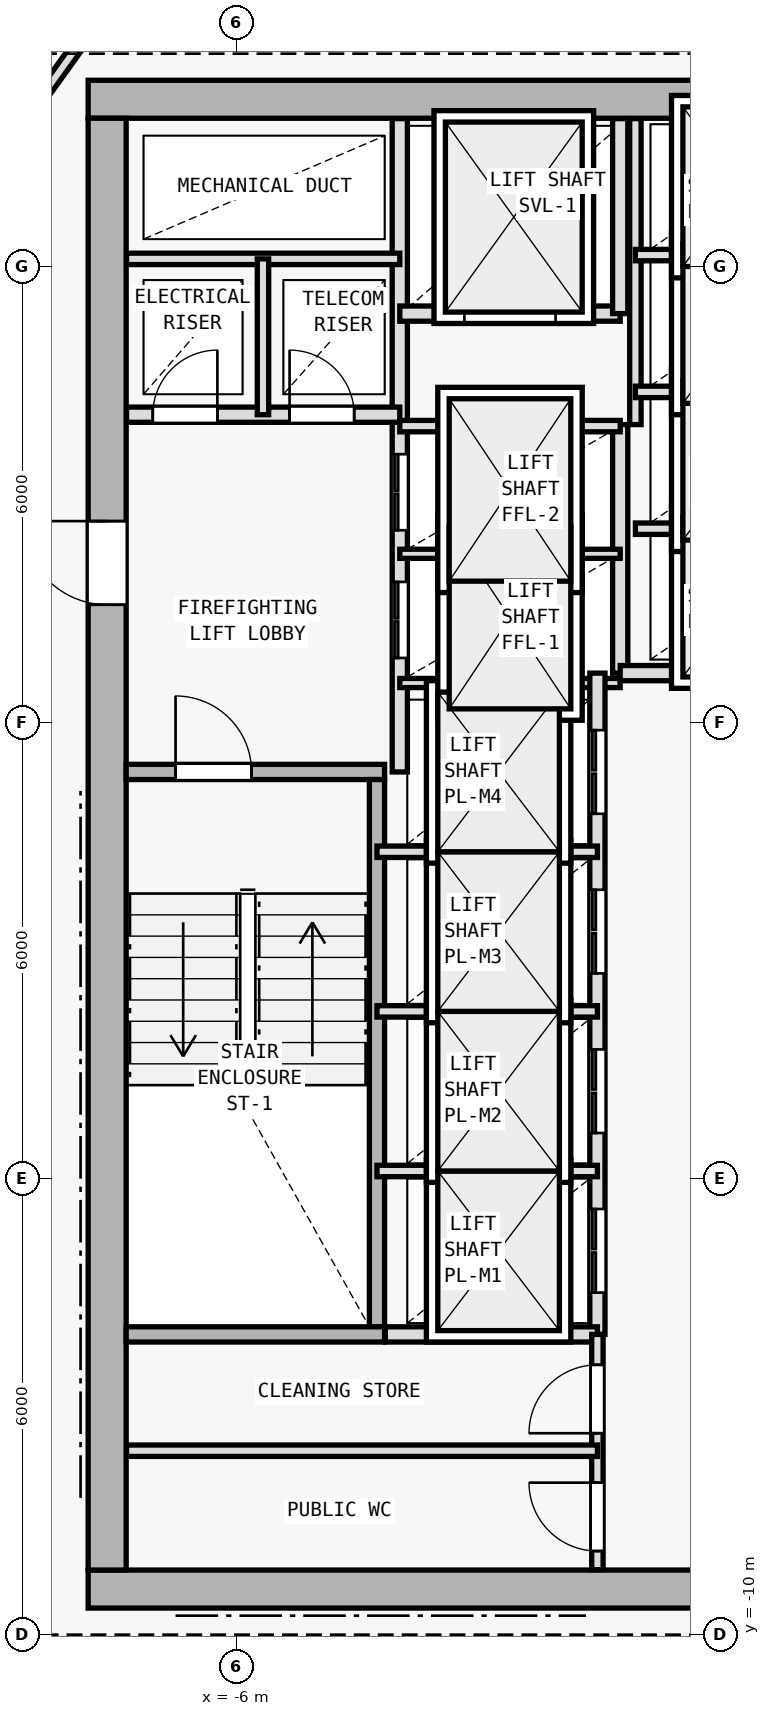
"""IFC4 building model, lengths in metres.
Left out: names, types, materials, properties, quantities, classifications, styles, units other than length and angle.
Written with IfcOpenShell. Run it as: python <this file> out.ifc"""

import sys

from ifc_helpers import new_model, si_unit, direction, frame, frame_2d, origin, origin_2d, place, context, subcontext, project, spatial, rectangle, i_section, extrude, element, fill, save


model = new_model("IFC4")
c1 = context("Model", 3, precision=1e-05, world=origin(), true_north=direction((0.0, 1.0)))
c2 = subcontext(c1, "Body", "Model", "MODEL_VIEW")
j1 = project(units=[si_unit("LENGTHUNIT", "METRE"), si_unit("PLANEANGLEUNIT", "RADIAN")], contexts=[c1])
p1 = place(None, origin())
s1 = spatial("IfcSite", under=j1, at=p1, CompositionType="ELEMENT")
p2 = place(p1, origin())
s2 = spatial("IfcBuilding", under=s1, at=p2, CompositionType="ELEMENT")
p3 = place(p2, frame((0.0, 0.0, 212.7)))
s3 = spatial("IfcBuildingStorey", under=s2, at=p3, CompositionType="ELEMENT", Elevation=212.7)
for number, where, z_axis, x_axis in (
    (1, (-7.7, -9.4, 0.0), (0.0, 0.0, 1.0), (1.0, 0.0, 0.0)),
    (2, (-7.7, 10.2, 0.0), (0.0, 0.0, 1.0), (1.0, 0.0, 0.0)),
    (3, (0.0, -9.4, 0.0), (0.0, 0.0, 1.0), (1.0, 0.0, 0.0)),
    (4, (-7.7, 2.0, 0.0), (0.0, 0.0, 1.0), (1.0, 0.0, 0.0)),
):
    element("IfcColumn", number, at=place(p3, frame(where, z_axis=z_axis, x_axis=x_axis)), inside=s3, PredefinedType="COLUMN", context=c2, shape_type="SweptSolid", body=[
        extrude(i_section(OverallWidth=0.398, OverallDepth=0.387, WebThickness=0.013, FlangeThickness=0.022, FilletRadius=0.015, at=origin_2d()), origin(), (0.0, 0.0, 1.0), 3.6),
    ])
p4 = place(p3, frame((-7.95, -9.4, 0.0), z_axis=(0.0, 0.0, 1.0), x_axis=(1.0, 0.0, 0.0)))
e5 = element("IfcWall", 5, at=p4, inside=s3, PredefinedType="SHEAR", context=c2, shape_type="SweptSolid", body=[
    extrude(rectangle(XDim=15.9, YDim=0.5, at=frame_2d((7.95, 0.0))), origin(), (0.0, 0.0, 1.0), 3.35),
])
p5 = place(p4, frame((9.6, 0.0, 0.0)))
e6 = element("IfcOpeningElement", 6, at=p5, cuts=e5, PredefinedType="OPENING", context=c2, shape_type="SweptSolid", body=[
    extrude(rectangle(XDim=1.5, YDim=2.2, at=frame_2d((0.75, 1.1))), frame((0.0, 0.26, 0.0), z_axis=(0.0, -1.0, 0.0), x_axis=(1.0, 0.0, 0.0)), (0.0, 0.0, 1.0), 0.52),
])
p6 = place(p3, frame((7.95, 10.2, 0.0), z_axis=(0.0, 0.0, 1.0), x_axis=(-1.0, 0.0, 0.0)))
e7 = element("IfcWall", 7, at=p6, inside=s3, PredefinedType="SHEAR", context=c2, shape_type="SweptSolid", body=[
    extrude(rectangle(XDim=15.9, YDim=0.5, at=frame_2d((7.95, 0.0))), origin(), (0.0, 0.0, 1.0), 3.35),
])
p7 = place(p6, frame((4.4, 0.0, 0.0)))
e8 = element("IfcOpeningElement", 8, at=p7, cuts=e7, PredefinedType="OPENING", context=c2, shape_type="SweptSolid", body=[
    extrude(rectangle(XDim=1.1, YDim=2.15, at=frame_2d((0.55, 1.075))), frame((0.0, 0.26, 0.0), z_axis=(0.0, -1.0, 0.0), x_axis=(1.0, 0.0, 0.0)), (0.0, 0.0, 1.0), 0.52),
])
p8 = place(p3, frame((-7.7, -9.15, 0.0), z_axis=(0.0, 0.0, 1.0), x_axis=(0.0, 1.0, 0.0)))
e9 = element("IfcWall", 9, at=p8, inside=s3, PredefinedType="SHEAR", context=c2, shape_type="SweptSolid", body=[
    extrude(rectangle(XDim=19.1, YDim=0.5, at=frame_2d((9.55, 0.0))), origin(), (0.0, 0.0, 1.0), 3.35),
])
p9 = place(p8, frame((12.7, 0.0, 0.0)))
e10 = element("IfcOpeningElement", 10, at=p9, cuts=e9, PredefinedType="OPENING", context=c2, shape_type="SweptSolid", body=[
    extrude(rectangle(XDim=1.1, YDim=2.15, at=frame_2d((0.55, 1.075))), frame((0.0, 0.26, 0.0), z_axis=(0.0, -1.0, 0.0), x_axis=(1.0, 0.0, 0.0)), (0.0, 0.0, 1.0), 0.52),
])
p10 = place(p3, frame((-7.45, 1.35, 0.0), z_axis=(0.0, 0.0, 1.0), x_axis=(1.0, 0.0, 0.0)))
e11 = element("IfcWall", 11, at=p10, inside=s3, PredefinedType="SOLIDWALL", context=c2, shape_type="SweptSolid", body=[
    extrude(rectangle(XDim=3.4, YDim=0.2, at=frame_2d((1.7, 0.0))), origin(), (0.0, 0.0, 1.0), 3.35),
])
p11 = place(p10, frame((0.65, 0.0, 0.0)))
e12 = element("IfcOpeningElement", 12, at=p11, cuts=e11, PredefinedType="OPENING", context=c2, shape_type="SweptSolid", body=[
    extrude(rectangle(XDim=1.0, YDim=2.15, at=frame_2d((0.5, 1.075))), frame((0.0, 0.11, 0.0), z_axis=(0.0, -1.0, 0.0), x_axis=(1.0, 0.0, 0.0)), (0.0, 0.0, 1.0), 0.22),
])
p12 = place(p3, frame((-4.15, -5.95, 0.0), z_axis=(0.0, 0.0, 1.0), x_axis=(0.0, 1.0, 0.0)))
e13 = element("IfcWall", 13, at=p12, inside=s3, PredefinedType="SOLIDWALL", context=c2, shape_type="SweptSolid", body=[
    extrude(rectangle(XDim=7.2, YDim=0.2, at=frame_2d((3.6, 0.0))), origin(), (0.0, 0.0, 1.0), 3.35),
])
p13 = place(p3, frame((-3.85, 1.35, 0.0), z_axis=(0.0, 0.0, 1.0), x_axis=(0.0, 1.0, 0.0)))
e14 = element("IfcWall", 14, at=p13, inside=s3, PredefinedType="SOLIDWALL", context=c2, shape_type="SweptSolid", body=[
    extrude(rectangle(XDim=8.595, YDim=0.2, at=frame_2d((4.297, 0.0))), origin(), (0.0, 0.0, 1.0), 3.35),
])
p14 = place(p13, frame((1.5, 0.0, 0.0)))
e15 = element("IfcOpeningElement", 15, at=p14, cuts=e14, PredefinedType="OPENING", context=c2, shape_type="SweptSolid", body=[
    extrude(rectangle(XDim=1.0, YDim=2.15, at=frame_2d((0.5, 1.075))), frame((0.0, 0.11, 0.0), z_axis=(0.0, -1.0, 0.0), x_axis=(1.0, 0.0, 0.0)), (0.0, 0.0, 1.0), 0.22),
])
p15 = place(p13, frame((3.18, 0.0, 0.0)))
e16 = element("IfcOpeningElement", 16, at=p15, cuts=e14, PredefinedType="OPENING", context=c2, shape_type="SweptSolid", body=[
    extrude(rectangle(XDim=1.0, YDim=2.15, at=frame_2d((0.5, 1.075))), frame((0.0, 0.11, 0.0), z_axis=(0.0, -1.0, 0.0), x_axis=(1.0, 0.0, 0.0)), (0.0, 0.0, 1.0), 0.22),
])
p16 = place(p3, frame((-7.445, 6.05, 0.0), z_axis=(0.0, 0.0, 1.0), x_axis=(1.0, 0.0, 0.0)))
e17 = element("IfcWall", 17, at=p16, inside=s3, PredefinedType="SOLIDWALL", context=c2, shape_type="SweptSolid", body=[
    extrude(rectangle(XDim=3.595, YDim=0.2, at=frame_2d((1.797, 0.0))), origin(), (0.0, 0.0, 1.0), 3.35),
])
p17 = place(p16, frame((0.345, 0.0, 0.0)))
e18 = element("IfcOpeningElement", 18, at=p17, cuts=e17, PredefinedType="OPENING", context=c2, shape_type="SweptSolid", body=[
    extrude(rectangle(XDim=0.85, YDim=2.1, at=frame_2d((0.425, 1.05))), frame((0.0, 0.11, 0.0), z_axis=(0.0, -1.0, 0.0), x_axis=(1.0, 0.0, 0.0)), (0.0, 0.0, 1.0), 0.22),
])
p18 = place(p16, frame((2.145, 0.0, 0.0)))
e19 = element("IfcOpeningElement", 19, at=p18, cuts=e17, PredefinedType="OPENING", context=c2, shape_type="SweptSolid", body=[
    extrude(rectangle(XDim=0.85, YDim=2.1, at=frame_2d((0.425, 1.05))), frame((0.0, 0.11, 0.0), z_axis=(0.0, -1.0, 0.0), x_axis=(1.0, 0.0, 0.0)), (0.0, 0.0, 1.0), 0.22),
])
p19 = place(p3, frame((-7.445, 8.1, 0.0), z_axis=(0.0, 0.0, 1.0), x_axis=(1.0, 0.0, 0.0)))
e20 = element("IfcWall", 20, at=p19, inside=s3, PredefinedType="PARTITIONING", context=c2, shape_type="SweptSolid", body=[
    extrude(rectangle(XDim=3.595, YDim=0.15, at=frame_2d((1.797, 0.0))), origin(), (0.0, 0.0, 1.0), 3.35),
])
p20 = place(p3, frame((-5.65, 6.05, 0.0), z_axis=(0.0, 0.0, 1.0), x_axis=(0.0, 1.0, 0.0)))
e21 = element("IfcWall", 21, at=p20, inside=s3, PredefinedType="PARTITIONING", context=c2, shape_type="SweptSolid", body=[
    extrude(rectangle(XDim=2.05, YDim=0.15, at=frame_2d((1.025, 0.0))), origin(), (0.0, 0.0, 1.0), 3.35),
])
p21 = place(p3, frame((-0.95, 2.65, 0.0), z_axis=(0.0, 0.0, 1.0), x_axis=(0.0, 1.0, 0.0)))
e22 = element("IfcWall", 22, at=p21, inside=s3, PredefinedType="SOLIDWALL", context=c2, shape_type="SweptSolid", body=[
    extrude(rectangle(XDim=3.27, YDim=0.2, at=frame_2d((1.635, 0.0))), origin(), (0.0, 0.0, 1.0), 3.35),
])
for number, where, z_axis, x_axis in (
    (23, (-3.85, 2.52, 0.0), (0.0, 0.0, 1.0), (1.0, 0.0, 0.0)),
    (24, (-3.85, 4.22, 0.0), (0.0, 0.0, 1.0), (1.0, 0.0, 0.0)),
):
    element("IfcWall", number, at=place(p3, frame(where, z_axis=z_axis, x_axis=x_axis)), inside=s3, PredefinedType="PARTITIONING", context=c2, shape_type="SweptSolid", body=[
        extrude(rectangle(XDim=2.9, YDim=0.12, at=frame_2d((1.45, 0.0))), origin(), (0.0, 0.0, 1.0), 3.35),
    ])
p22 = place(p3, frame((-3.85, 5.9, 0.0), z_axis=(0.0, 0.0, 1.0), x_axis=(1.0, 0.0, 0.0)))
e25 = element("IfcWall", 25, at=p22, inside=s3, PredefinedType="PARTITIONING", context=c2, shape_type="SweptSolid", body=[
    extrude(rectangle(XDim=2.9, YDim=0.15, at=frame_2d((1.45, 0.0))), origin(), (0.0, 0.0, 1.0), 3.35),
])
p23 = place(p3, frame((-3.85, 7.38, 0.0), z_axis=(0.0, 0.0, 1.0), x_axis=(1.0, 0.0, 0.0)))
e26 = element("IfcWall", 26, at=p23, inside=s3, PredefinedType="SOLIDWALL", context=c2, shape_type="SweptSolid", body=[
    extrude(rectangle(XDim=2.9, YDim=0.2, at=frame_2d((1.45, 0.0))), origin(), (0.0, 0.0, 1.0), 3.35),
])
p24 = place(p23, frame((0.85, 0.0, 0.0)))
e27 = element("IfcOpeningElement", 27, at=p24, cuts=e26, PredefinedType="OPENING", context=c2, shape_type="SweptSolid", body=[
    extrude(rectangle(XDim=1.2, YDim=2.2, at=frame_2d((0.6, 1.1))), frame((0.0, 0.11, 0.0), z_axis=(0.0, -1.0, 0.0), x_axis=(1.0, 0.0, 0.0)), (0.0, 0.0, 1.0), 0.22),
])
p25 = place(p3, frame((-0.95, 7.38, 0.0), z_axis=(0.0, 0.0, 1.0), x_axis=(0.0, 1.0, 0.0)))
e28 = element("IfcWall", 28, at=p25, inside=s3, PredefinedType="SOLIDWALL", context=c2, shape_type="SweptSolid", body=[
    extrude(rectangle(XDim=2.565, YDim=0.2, at=frame_2d((1.283, 0.0))), origin(), (0.0, 0.0, 1.0), 3.35),
])
p26 = place(p3, frame((-1.25, -6.05, 0.0), z_axis=(0.0, 0.0, 1.0), x_axis=(0.0, 1.0, 0.0)))
e29 = element("IfcWall", 29, at=p26, inside=s3, PredefinedType="SOLIDWALL", context=c2, shape_type="SweptSolid", body=[
    extrude(rectangle(XDim=8.7, YDim=0.2, at=frame_2d((4.35, 0.0))), origin(), (0.0, 0.0, 1.0), 3.35),
])
p27 = place(p26, frame((0.55, 0.0, 0.0)))
e30 = element("IfcOpeningElement", 30, at=p27, cuts=e29, PredefinedType="OPENING", context=c2, shape_type="SweptSolid", body=[
    extrude(rectangle(XDim=1.1, YDim=2.15, at=frame_2d((0.55, 1.075))), frame((0.0, 0.11, 0.0), z_axis=(0.0, -1.0, 0.0), x_axis=(1.0, 0.0, 0.0)), (0.0, 0.0, 1.0), 0.22),
])
p28 = place(p26, frame((2.65, 0.0, 0.0)))
e31 = element("IfcOpeningElement", 31, at=p28, cuts=e29, PredefinedType="OPENING", context=c2, shape_type="SweptSolid", body=[
    extrude(rectangle(XDim=1.1, YDim=2.15, at=frame_2d((0.55, 1.075))), frame((0.0, 0.11, 0.0), z_axis=(0.0, -1.0, 0.0), x_axis=(1.0, 0.0, 0.0)), (0.0, 0.0, 1.0), 0.22),
])
p29 = place(p26, frame((4.75, 0.0, 0.0)))
e32 = element("IfcOpeningElement", 32, at=p29, cuts=e29, PredefinedType="OPENING", context=c2, shape_type="SweptSolid", body=[
    extrude(rectangle(XDim=1.1, YDim=2.15, at=frame_2d((0.55, 1.075))), frame((0.0, 0.11, 0.0), z_axis=(0.0, -1.0, 0.0), x_axis=(1.0, 0.0, 0.0)), (0.0, 0.0, 1.0), 0.22),
])
p30 = place(p26, frame((6.85, 0.0, 0.0)))
e33 = element("IfcOpeningElement", 33, at=p30, cuts=e29, PredefinedType="OPENING", context=c2, shape_type="SweptSolid", body=[
    extrude(rectangle(XDim=1.1, YDim=2.15, at=frame_2d((0.55, 1.075))), frame((0.0, 0.11, 0.0), z_axis=(0.0, -1.0, 0.0), x_axis=(1.0, 0.0, 0.0)), (0.0, 0.0, 1.0), 0.22),
])
for number, where, z_axis, x_axis in (
    (34, (-4.15, -3.9, 0.0), (0.0, 0.0, 1.0), (1.0, 0.0, 0.0)),
    (35, (-4.15, -1.8, 0.0), (0.0, 0.0, 1.0), (1.0, 0.0, 0.0)),
    (36, (-4.15, 0.3, 0.0), (0.0, 0.0, 1.0), (1.0, 0.0, 0.0)),
):
    element("IfcWall", number, at=place(p3, frame(where, z_axis=z_axis, x_axis=x_axis)), inside=s3, PredefinedType="PARTITIONING", context=c2, shape_type="SweptSolid", body=[
        extrude(rectangle(XDim=2.9, YDim=0.15, at=frame_2d((1.45, 0.0))), origin(), (0.0, 0.0, 1.0), 3.35),
    ])
p31 = place(p3, frame((-0.95, 2.65, 0.0), z_axis=(0.0, 0.0, 1.0), x_axis=(1.0, 0.0, 0.0)))
e37 = element("IfcWall", 37, at=p31, inside=s3, PredefinedType="SOLIDWALL", context=c2, shape_type="SweptSolid", body=[
    extrude(rectangle(XDim=2.9, YDim=0.2, at=frame_2d((1.45, 0.0))), origin(), (0.0, 0.0, 1.0), 3.35),
])
p32 = place(p3, frame((-0.75, 5.92, 0.0), z_axis=(0.0, 0.0, 1.0), x_axis=(0.0, 1.0, 0.0)))
e38 = element("IfcWall", 38, at=p32, inside=s3, PredefinedType="PARTITIONING", context=c2, shape_type="SweptSolid", body=[
    extrude(rectangle(XDim=4.025, YDim=0.15, at=frame_2d((2.013, 0.0))), origin(), (0.0, 0.0, 1.0), 3.35),
])
for number, where, z_axis, x_axis in (
    (39, (-0.75, 4.55, 0.0), (0.0, 0.0, 1.0), (1.0, 0.0, 0.0)),
    (40, (-0.75, 6.35, 0.0), (0.0, 0.0, 1.0), (1.0, 0.0, 0.0)),
    (41, (-0.75, 8.15, 0.0), (0.0, 0.0, 1.0), (1.0, 0.0, 0.0)),
):
    element("IfcWall", number, at=place(p3, frame(where, z_axis=z_axis, x_axis=x_axis)), inside=s3, PredefinedType="PARTITIONING", context=c2, shape_type="SweptSolid", body=[
        extrude(rectangle(XDim=2.7, YDim=0.15, at=frame_2d((1.35, 0.0))), origin(), (0.0, 0.0, 1.0), 3.35),
    ])
p33 = place(p3, frame((-7.45, -6.05, 0.0), z_axis=(0.0, 0.0, 1.0), x_axis=(1.0, 0.0, 0.0)))
e42 = element("IfcWall", 42, at=p33, inside=s3, PredefinedType="SOLIDWALL", context=c2, shape_type="SweptSolid", body=[
    extrude(rectangle(XDim=3.4, YDim=0.2, at=frame_2d((1.7, 0.0))), origin(), (0.0, 0.0, 1.0), 3.35),
])
p34 = place(p3, frame((-4.04, -6.05, 0.0), z_axis=(0.0, 0.0, 1.0), x_axis=(1.0, 0.0, 0.0)))
e43 = element("IfcWall", 43, at=p34, inside=s3, PredefinedType="SOLIDWALL", context=c2, shape_type="SweptSolid", body=[
    extrude(rectangle(XDim=2.79, YDim=0.2, at=frame_2d((1.395, 0.0))), origin(), (0.0, 0.0, 1.0), 3.35),
])
p35 = place(p3, frame((-1.25, -9.145, 0.0), z_axis=(0.0, 0.0, 1.0), x_axis=(0.0, 1.0, 0.0)))
e44 = element("IfcWall", 44, at=p35, inside=s3, PredefinedType="PARTITIONING", context=c2, shape_type="SweptSolid", body=[
    extrude(rectangle(XDim=3.095, YDim=0.15, at=frame_2d((1.547, 0.0))), origin(), (0.0, 0.0, 1.0), 3.35),
])
p36 = place(p35, frame((1.795, 0.0, 0.0)))
e45 = element("IfcOpeningElement", 45, at=p36, cuts=e44, PredefinedType="OPENING", context=c2, shape_type="SweptSolid", body=[
    extrude(rectangle(XDim=0.9, YDim=2.1, at=frame_2d((0.45, 1.05))), frame((0.0, 0.085, 0.0), z_axis=(0.0, -1.0, 0.0), x_axis=(1.0, 0.0, 0.0)), (0.0, 0.0, 1.0), 0.17),
])
p37 = place(p35, frame((0.245, 0.0, 0.0)))
e46 = element("IfcOpeningElement", 46, at=p37, cuts=e44, PredefinedType="OPENING", context=c2, shape_type="SweptSolid", body=[
    extrude(rectangle(XDim=0.9, YDim=2.1, at=frame_2d((0.45, 1.05))), frame((0.0, 0.085, 0.0), z_axis=(0.0, -1.0, 0.0), x_axis=(1.0, 0.0, 0.0)), (0.0, 0.0, 1.0), 0.17),
])
p38 = place(p3, frame((-7.445, -7.58, 0.0), z_axis=(0.0, 0.0, 1.0), x_axis=(1.0, 0.0, 0.0)))
e47 = element("IfcWall", 47, at=p38, inside=s3, PredefinedType="PARTITIONING", context=c2, shape_type="SweptSolid", body=[
    extrude(rectangle(XDim=6.195, YDim=0.15, at=frame_2d((3.098, 0.0))), origin(), (0.0, 0.0, 1.0), 3.35),
])
p39 = place(p3, frame((-9.86, 8.426, 0.0), z_axis=(0.0, 0.0, 1.0), x_axis=(0.582449511476, 0.812866881218, 0.0)))
e48 = element("IfcWall", 48, at=p39, inside=s3, PredefinedType="PARTITIONING", context=c2, shape_type="SweptSolid", body=[
    extrude(rectangle(XDim=4.84, YDim=0.15, at=frame_2d((2.42, 0.0))), origin(), (0.0, 0.0, 1.0), 2.975),
])
p40 = place(p9, origin())
e49 = element("IfcDoor", 49, at=p40, inside=s3, OperationType="SINGLE_SWING_RIGHT", PredefinedType="DOOR", context=c2, shape_type="SweptSolid", body=[
    extrude(rectangle(XDim=1.1, YDim=2.15, at=frame_2d((0.55, 1.075))), frame((0.0, 0.025, 0.0), z_axis=(0.0, -1.0, 0.0), x_axis=(1.0, 0.0, 0.0)), (0.0, 0.0, 1.0), 0.05),
])
fill(e10, e49)
p41 = place(p11, origin())
e50 = element("IfcDoor", 50, at=p41, inside=s3, OperationType="SINGLE_SWING_LEFT", PredefinedType="DOOR", context=c2, shape_type="SweptSolid", body=[
    extrude(rectangle(XDim=1.0, YDim=2.15, at=frame_2d((0.5, 1.075))), frame((0.0, 0.025, 0.0), z_axis=(0.0, -1.0, 0.0), x_axis=(1.0, 0.0, 0.0)), (0.0, 0.0, 1.0), 0.05),
])
fill(e12, e50)
p42 = place(p17, origin())
e51 = element("IfcDoor", 51, at=p42, inside=s3, OperationType="SINGLE_SWING_RIGHT", PredefinedType="DOOR", context=c2, shape_type="SweptSolid", body=[
    extrude(rectangle(XDim=0.85, YDim=2.1, at=frame_2d((0.425, 1.05))), frame((0.0, 0.025, 0.0), z_axis=(0.0, -1.0, 0.0), x_axis=(1.0, 0.0, 0.0)), (0.0, 0.0, 1.0), 0.05),
])
fill(e18, e51)
p43 = place(p18, origin())
e52 = element("IfcDoor", 52, at=p43, inside=s3, OperationType="SINGLE_SWING_LEFT", PredefinedType="DOOR", context=c2, shape_type="SweptSolid", body=[
    extrude(rectangle(XDim=0.85, YDim=2.1, at=frame_2d((0.425, 1.05))), frame((0.0, 0.025, 0.0), z_axis=(0.0, -1.0, 0.0), x_axis=(1.0, 0.0, 0.0)), (0.0, 0.0, 1.0), 0.05),
])
fill(e19, e52)
p44 = place(p24, origin())
e53 = element("IfcDoor", 53, at=p44, inside=s3, OperationType="DOUBLE_DOOR_SLIDING", PredefinedType="DOOR", context=c2, shape_type="SweptSolid", body=[
    extrude(rectangle(XDim=1.2, YDim=2.2, at=frame_2d((0.6, 1.1))), frame((0.0, 0.025, 0.0), z_axis=(0.0, -1.0, 0.0), x_axis=(1.0, 0.0, 0.0)), (0.0, 0.0, 1.0), 0.05),
])
fill(e27, e53)
p45 = place(p27, origin())
e54 = element("IfcDoor", 54, at=p45, inside=s3, OperationType="DOUBLE_DOOR_SLIDING", PredefinedType="DOOR", context=c2, shape_type="SweptSolid", body=[
    extrude(rectangle(XDim=1.1, YDim=2.15, at=frame_2d((0.55, 1.075))), frame((0.0, 0.025, 0.0), z_axis=(0.0, -1.0, 0.0), x_axis=(1.0, 0.0, 0.0)), (0.0, 0.0, 1.0), 0.05),
])
fill(e30, e54)
p46 = place(p28, origin())
e55 = element("IfcDoor", 55, at=p46, inside=s3, OperationType="DOUBLE_DOOR_SLIDING", PredefinedType="DOOR", context=c2, shape_type="SweptSolid", body=[
    extrude(rectangle(XDim=1.1, YDim=2.15, at=frame_2d((0.55, 1.075))), frame((0.0, 0.025, 0.0), z_axis=(0.0, -1.0, 0.0), x_axis=(1.0, 0.0, 0.0)), (0.0, 0.0, 1.0), 0.05),
])
fill(e31, e55)
p47 = place(p29, origin())
e56 = element("IfcDoor", 56, at=p47, inside=s3, OperationType="DOUBLE_DOOR_SLIDING", PredefinedType="DOOR", context=c2, shape_type="SweptSolid", body=[
    extrude(rectangle(XDim=1.1, YDim=2.15, at=frame_2d((0.55, 1.075))), frame((0.0, 0.025, 0.0), z_axis=(0.0, -1.0, 0.0), x_axis=(1.0, 0.0, 0.0)), (0.0, 0.0, 1.0), 0.05),
])
fill(e32, e56)
p48 = place(p30, origin())
e57 = element("IfcDoor", 57, at=p48, inside=s3, OperationType="DOUBLE_DOOR_SLIDING", PredefinedType="DOOR", context=c2, shape_type="SweptSolid", body=[
    extrude(rectangle(XDim=1.1, YDim=2.15, at=frame_2d((0.55, 1.075))), frame((0.0, 0.025, 0.0), z_axis=(0.0, -1.0, 0.0), x_axis=(1.0, 0.0, 0.0)), (0.0, 0.0, 1.0), 0.05),
])
fill(e33, e57)
p49 = place(p14, origin())
e58 = element("IfcDoor", 58, at=p49, inside=s3, OperationType="DOUBLE_DOOR_SLIDING", PredefinedType="DOOR", context=c2, shape_type="SweptSolid", body=[
    extrude(rectangle(XDim=1.0, YDim=2.15, at=frame_2d((0.5, 1.075))), frame((0.0, 0.025, 0.0), z_axis=(0.0, -1.0, 0.0), x_axis=(1.0, 0.0, 0.0)), (0.0, 0.0, 1.0), 0.05),
])
fill(e15, e58)
p50 = place(p15, origin())
e59 = element("IfcDoor", 59, at=p50, inside=s3, OperationType="DOUBLE_DOOR_SLIDING", PredefinedType="DOOR", context=c2, shape_type="SweptSolid", body=[
    extrude(rectangle(XDim=1.0, YDim=2.15, at=frame_2d((0.5, 1.075))), frame((0.0, 0.025, 0.0), z_axis=(0.0, -1.0, 0.0), x_axis=(1.0, 0.0, 0.0)), (0.0, 0.0, 1.0), 0.05),
])
fill(e16, e59)
p51 = place(p36, origin())
e60 = element("IfcDoor", 60, at=p51, inside=s3, OperationType="SINGLE_SWING_LEFT", PredefinedType="DOOR", context=c2, shape_type="SweptSolid", body=[
    extrude(rectangle(XDim=0.9, YDim=2.1, at=frame_2d((0.45, 1.05))), frame((0.0, 0.025, 0.0), z_axis=(0.0, -1.0, 0.0), x_axis=(1.0, 0.0, 0.0)), (0.0, 0.0, 1.0), 0.05),
])
fill(e45, e60)
p52 = place(p37, origin())
e61 = element("IfcDoor", 61, at=p52, inside=s3, OperationType="SINGLE_SWING_RIGHT", PredefinedType="DOOR", context=c2, shape_type="SweptSolid", body=[
    extrude(rectangle(XDim=0.9, YDim=2.1, at=frame_2d((0.45, 1.05))), frame((0.0, 0.025, 0.0), z_axis=(0.0, -1.0, 0.0), x_axis=(1.0, 0.0, 0.0)), (0.0, 0.0, 1.0), 0.05),
])
fill(e46, e61)
save(model, sys.argv[1])
